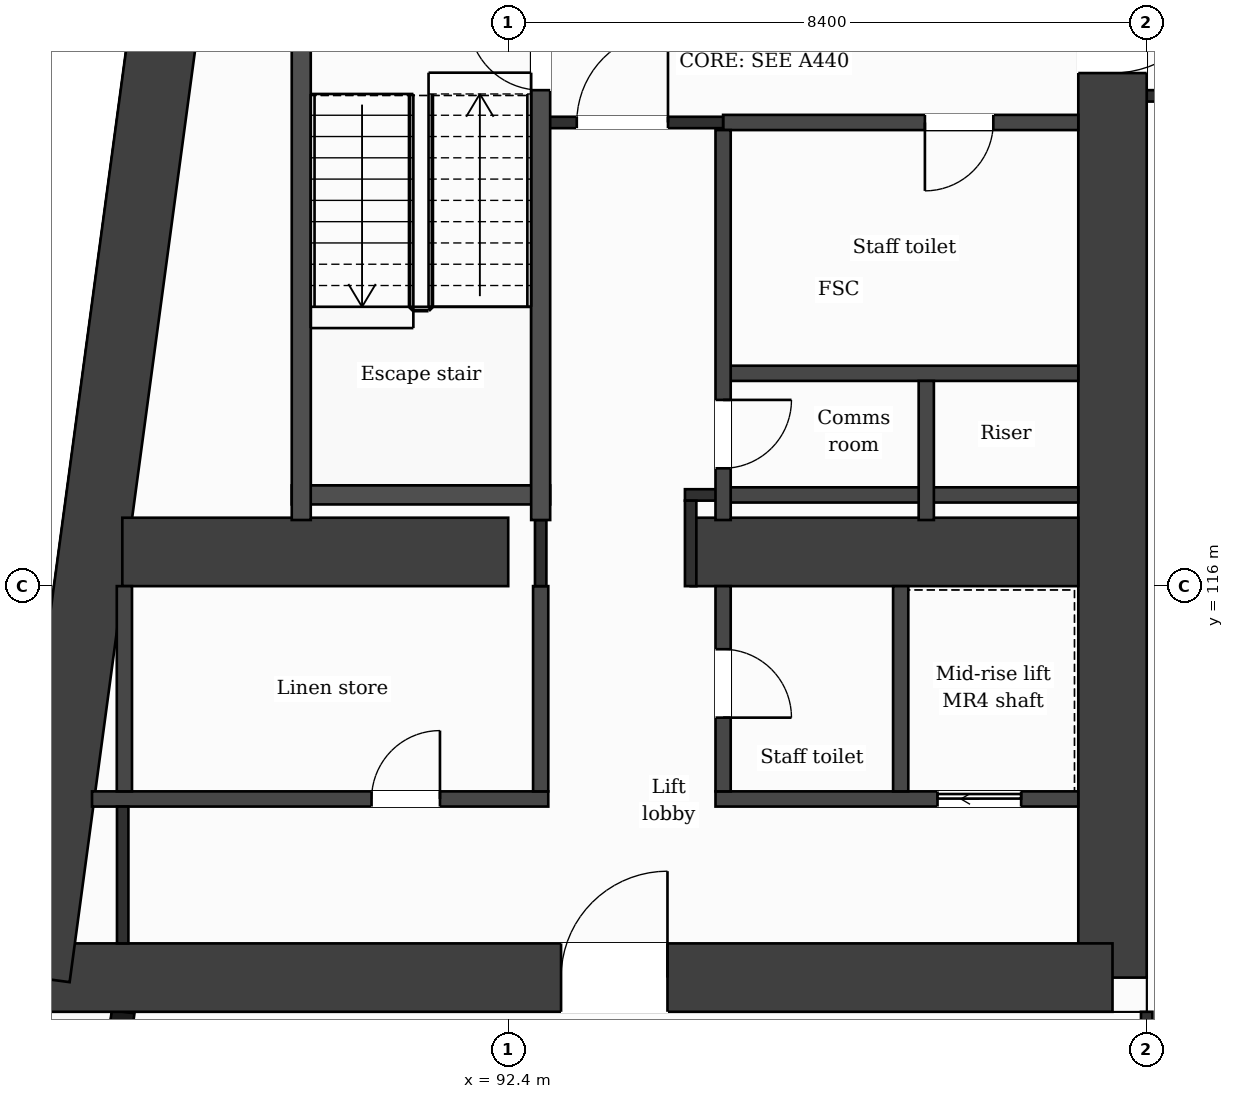
"""IFC4 building model, lengths in metres.
Left out: names, types, materials, properties, quantities, classifications, styles, units other than length and angle.
Written with IfcOpenShell. Run it as: python <this file> out.ifc"""

import sys

from ifc_helpers import new_model, si_unit, direction, frame, frame_2d, origin, place, context, subcontext, project, spatial, rectangle, extrude, element, fill, save


model = new_model("IFC4")
c1 = context("Model", 3, precision=1e-05, world=origin(), true_north=direction((0.0, 1.0)))
c2 = subcontext(c1, "Body", "Model", "MODEL_VIEW")
j1 = project(units=[si_unit("LENGTHUNIT", "METRE"), si_unit("PLANEANGLEUNIT", "RADIAN")], contexts=[c1])
p1 = place(None, origin())
s1 = spatial("IfcSite", under=j1, at=p1, CompositionType="ELEMENT")
p2 = place(p1, origin())
s2 = spatial("IfcBuilding", under=s1, at=p2, CompositionType="ELEMENT")
p3 = place(p2, frame((0.0, 0.0, 166.3)))
s3 = spatial("IfcBuildingStorey", under=s2, at=p3, CompositionType="ELEMENT", Elevation=166.3)
p4 = place(p3, frame((100.35, 131.95, 0.0), z_axis=(0.0, 0.0, 1.0), x_axis=(0.0, -1.0, 0.0)))
e1 = element("IfcWall", 1, at=p4, inside=s3, PredefinedType="SHEAR", context=c2, shape_type="SweptSolid", body=[
    extrude(rectangle(XDim=21.1, YDim=0.9, at=frame_2d((10.55, 0.0))), origin(), (0.0, 0.0, 1.0), 3.7),
])
p5 = place(p4, frame((7.8, 0.0, 0.0)))
e2 = element("IfcOpeningElement", 2, at=p5, cuts=e1, PredefinedType="OPENING", context=c2, shape_type="SweptSolid", body=[
    extrude(rectangle(XDim=1.4, YDim=2.1, at=frame_2d((0.7, 1.05))), frame((0.0, 0.46, 0.0), z_axis=(0.0, -1.0, 0.0), x_axis=(1.0, 0.0, 0.0)), (0.0, 0.0, 1.0), 0.92),
])
p6 = place(p3, frame((100.35, 110.85, 0.0), z_axis=(0.0, 0.0, 1.0), x_axis=(-1.0, 0.0, 0.0)))
e3 = element("IfcWall", 3, at=p6, inside=s3, PredefinedType="SHEAR", context=c2, shape_type="SweptSolid", body=[
    extrude(rectangle(XDim=14.166, YDim=0.9, at=frame_2d((7.083, 0.0))), origin(), (0.0, 0.0, 1.0), 3.7),
])
p7 = place(p6, frame((5.855, 0.0, 0.0)))
e4 = element("IfcOpeningElement", 4, at=p7, cuts=e3, PredefinedType="OPENING", context=c2, shape_type="SweptSolid", body=[
    extrude(rectangle(XDim=1.4, YDim=2.1, at=frame_2d((0.7, 1.05))), frame((0.0, 0.46, 0.0), z_axis=(0.0, -1.0, 0.0), x_axis=(1.0, 0.0, 0.0)), (0.0, 0.0, 1.0), 0.92),
])
p8 = place(p3, frame((86.184, 110.85, 0.0), z_axis=(0.0, 0.0, 1.0), x_axis=(0.133410495943, 0.991060865725, 0.0)))
e5 = element("IfcWall", 5, at=p8, inside=s3, PredefinedType="SHEAR", context=c2, shape_type="SweptSolid", body=[
    extrude(rectangle(XDim=21.29, YDim=0.9, at=frame_2d((10.645, 0.0))), origin(), (0.0, 0.0, 1.0), 3.7),
])
p9 = place(p3, frame((87.323, 116.45, 0.0), z_axis=(0.0, 0.0, 1.0), x_axis=(1.0, 0.0, 0.0)))
e6 = element("IfcWall", 6, at=p9, inside=s3, PredefinedType="SHEAR", context=c2, shape_type="SweptSolid", body=[
    extrude(rectangle(XDim=5.077, YDim=0.9, at=frame_2d((2.539, 0.0))), origin(), (0.0, 0.0, 1.0), 3.7),
])
p10 = place(p3, frame((94.8, 116.45, 0.0), z_axis=(0.0, 0.0, 1.0), x_axis=(1.0, 0.0, 0.0)))
e7 = element("IfcWall", 7, at=p10, inside=s3, PredefinedType="SHEAR", context=c2, shape_type="SweptSolid", body=[
    extrude(rectangle(XDim=5.1, YDim=0.9, at=frame_2d((2.55, 0.0))), origin(), (0.0, 0.0, 1.0), 3.7),
])
p11 = place(p3, frame((87.334, 110.4, 0.0), z_axis=(0.0, 0.0, 1.0), x_axis=(-0.133437175554, -0.991057273915, 0.0)))
e8 = element("IfcWall", 8, at=p11, inside=s3, PredefinedType="SOLIDWALL", context=c2, shape_type="SweptSolid", body=[
    extrude(rectangle(XDim=6.781, YDim=0.3, at=frame_2d((3.39, 0.0))), origin(), (0.0, 0.0, 1.0), 3.38),
])
p12 = place(p11, frame((1.418, 0.0, 0.0)))
e9 = element("IfcOpeningElement", 9, at=p12, cuts=e8, PredefinedType="OPENING", context=c2, shape_type="SweptSolid", body=[
    extrude(rectangle(XDim=1.2, YDim=2.4, at=frame_2d((0.6, 1.2))), frame((0.0, 0.16, 0.0), z_axis=(0.0, -1.0, 0.0), x_axis=(1.0, 0.0, 0.0)), (0.0, 0.0, 1.0), 0.32),
])
p13 = place(p11, frame((4.758, 0.0, 0.9)))
e10 = element("IfcOpeningElement", 10, at=p13, cuts=e8, PredefinedType="OPENING", context=c2, shape_type="SweptSolid", body=[
    extrude(rectangle(XDim=1.2, YDim=2.1, at=frame_2d((0.6, 1.05))), frame((0.0, 0.16, 0.0), z_axis=(0.0, -1.0, 0.0), x_axis=(1.0, 0.0, 0.0)), (0.0, 0.0, 1.0), 0.32),
])
p14 = place(p3, frame((86.924, 113.2, 0.0), z_axis=(0.0, 0.0, 1.0), x_axis=(1.0, 0.0, 0.0)))
e11 = element("IfcWall", 11, at=p14, inside=s3, PredefinedType="PARTITIONING", context=c2, shape_type="SweptSolid", body=[
    extrude(rectangle(XDim=6.003, YDim=0.2, at=frame_2d((3.001, 0.0))), origin(), (0.0, 0.0, 1.0), 3.38),
])
p15 = place(p14, frame((3.678, 0.0, 0.0)))
e12 = element("IfcOpeningElement", 12, at=p15, cuts=e11, PredefinedType="OPENING", context=c2, shape_type="SweptSolid", body=[
    extrude(rectangle(XDim=0.9, YDim=2.1, at=frame_2d((0.45, 1.05))), frame((0.0, 0.11, 0.0), z_axis=(0.0, -1.0, 0.0), x_axis=(1.0, 0.0, 0.0)), (0.0, 0.0, 1.0), 0.22),
])
p16 = place(p3, frame((95.127, 113.2, 0.0), z_axis=(0.0, 0.0, 1.0), x_axis=(1.0, 0.0, 0.0)))
e13 = element("IfcWall", 13, at=p16, inside=s3, PredefinedType="PARTITIONING", context=c2, shape_type="SweptSolid", body=[
    extrude(rectangle(XDim=4.773, YDim=0.2, at=frame_2d((2.386, 0.0))), origin(), (0.0, 0.0, 1.0), 3.38),
])
p17 = place(p16, frame((2.921, 0.0, 0.0)))
e14 = element("IfcOpeningElement", 14, at=p17, cuts=e13, PredefinedType="OPENING", context=c2, shape_type="SweptSolid", body=[
    extrude(rectangle(XDim=1.1, YDim=2.1, at=frame_2d((0.55, 1.05))), frame((0.0, 0.11, 0.0), z_axis=(0.0, -1.0, 0.0), x_axis=(1.0, 0.0, 0.0)), (0.0, 0.0, 1.0), 0.22),
])
p18 = place(p3, frame((95.227, 117.2, 0.0), z_axis=(0.0, 0.0, 1.0), x_axis=(1.0, 0.0, 0.0)))
e15 = element("IfcWall", 15, at=p18, inside=s3, PredefinedType="PARTITIONING", context=c2, shape_type="SweptSolid", body=[
    extrude(rectangle(XDim=4.673, YDim=0.2, at=frame_2d((2.336, 0.0))), origin(), (0.0, 0.0, 1.0), 3.38),
])
p19 = place(p3, frame((94.725, 117.2, 0.0), z_axis=(0.0, 0.0, 1.0), x_axis=(1.0, 0.0, 0.0)))
e16 = element("IfcWall", 16, at=p19, inside=s3, PredefinedType="PARTITIONING", context=c2, shape_type="SweptSolid", body=[
    extrude(rectangle(XDim=0.502, YDim=0.15, at=frame_2d((0.251, 0.0))), origin(), (0.0, 0.0, 1.0), 3.38),
])
p20 = place(p3, frame((89.552, 117.2, 0.0), z_axis=(0.0, 0.0, 1.0), x_axis=(1.0, 0.0, 0.0)))
e17 = element("IfcWall", 17, at=p20, inside=s3, PredefinedType="PARTITIONING", context=c2, shape_type="SweptSolid", body=[
    extrude(rectangle(XDim=3.4, YDim=0.25, at=frame_2d((1.7, 0.0))), origin(), (0.0, 0.0, 1.0), 3.38),
])
p21 = place(p3, frame((95.227, 118.8, 0.0), z_axis=(0.0, 0.0, 1.0), x_axis=(1.0, 0.0, 0.0)))
e18 = element("IfcWall", 18, at=p21, inside=s3, PredefinedType="PARTITIONING", context=c2, shape_type="SweptSolid", body=[
    extrude(rectangle(XDim=4.673, YDim=0.2, at=frame_2d((2.336, 0.0))), origin(), (0.0, 0.0, 1.0), 3.38),
])
p22 = place(p3, frame((95.227, 122.1, 0.0), z_axis=(0.0, 0.0, 1.0), x_axis=(1.0, 0.0, 0.0)))
e19 = element("IfcWall", 19, at=p22, inside=s3, PredefinedType="PARTITIONING", context=c2, shape_type="SweptSolid", body=[
    extrude(rectangle(XDim=4.673, YDim=0.2, at=frame_2d((2.336, 0.0))), origin(), (0.0, 0.0, 1.0), 3.38),
])
p23 = place(p22, frame((2.655, 0.0, 0.0)))
e20 = element("IfcOpeningElement", 20, at=p23, cuts=e19, PredefinedType="OPENING", context=c2, shape_type="SweptSolid", body=[
    extrude(rectangle(XDim=0.9, YDim=2.1, at=frame_2d((0.45, 1.05))), frame((0.0, 0.11, 0.0), z_axis=(0.0, -1.0, 0.0), x_axis=(1.0, 0.0, 0.0)), (0.0, 0.0, 1.0), 0.22),
])
p24 = place(p3, frame((92.827, 122.1, 0.0), z_axis=(0.0, 0.0, 1.0), x_axis=(1.0, 0.0, 0.0)))
e21 = element("IfcWall", 21, at=p24, inside=s3, PredefinedType="PARTITIONING", context=c2, shape_type="SweptSolid", body=[
    extrude(rectangle(XDim=2.4, YDim=0.15, at=frame_2d((1.2, 0.0))), origin(), (0.0, 0.0, 1.0), 3.38),
])
p25 = place(p24, frame((0.475, 0.0, 0.0)))
e22 = element("IfcOpeningElement", 22, at=p25, cuts=e21, PredefinedType="OPENING", context=c2, shape_type="SweptSolid", body=[
    extrude(rectangle(XDim=1.2, YDim=2.1, at=frame_2d((0.6, 1.05))), frame((0.0, 0.085, 0.0), z_axis=(0.0, -1.0, 0.0), x_axis=(1.0, 0.0, 0.0)), (0.0, 0.0, 1.0), 0.17),
])
p26 = place(p3, frame((100.8, 122.45, 0.0), z_axis=(0.0, 0.0, 1.0), x_axis=(1.0, 0.0, 0.0)))
e23 = element("IfcWall", 23, at=p26, inside=s3, PredefinedType="PARTITIONING", context=c2, shape_type="SweptSolid", body=[
    extrude(rectangle(XDim=25.2, YDim=0.15, at=frame_2d((12.6, 0.0))), origin(), (0.0, 0.0, 1.0), 3.38),
])
p27 = place(p3, frame((87.35, 113.3, 0.0), z_axis=(0.0, 0.0, 1.0), x_axis=(0.0, 1.0, 0.0)))
e24 = element("IfcWall", 24, at=p27, inside=s3, PredefinedType="PARTITIONING", context=c2, shape_type="SweptSolid", body=[
    extrude(rectangle(XDim=2.7, YDim=0.2, at=frame_2d((1.35, 0.0))), origin(), (0.0, 0.0, 1.0), 3.38),
])
p28 = place(p3, frame((87.328, 111.3, 0.0), z_axis=(0.0, 0.0, 1.0), x_axis=(0.0, 1.0, 0.0)))
e25 = element("IfcWall", 25, at=p28, inside=s3, PredefinedType="PARTITIONING", context=c2, shape_type="SweptSolid", body=[
    extrude(rectangle(XDim=1.8, YDim=0.15, at=frame_2d((0.9, 0.0))), origin(), (0.0, 0.0, 1.0), 3.38),
])
p29 = place(p3, frame((89.677, 116.87, 0.0), z_axis=(0.0, 0.0, 1.0), x_axis=(0.0, 1.0, 0.0)))
e26 = element("IfcWall", 26, at=p29, inside=s3, PredefinedType="PARTITIONING", context=c2, shape_type="SweptSolid", body=[
    extrude(rectangle(XDim=6.955, YDim=0.25, at=frame_2d((3.478, 0.0))), origin(), (0.0, 0.0, 1.0), 3.38),
])
p30 = place(p3, frame((92.827, 113.3, 0.0), z_axis=(0.0, 0.0, 1.0), x_axis=(0.0, 1.0, 0.0)))
e27 = element("IfcWall", 27, at=p30, inside=s3, PredefinedType="PARTITIONING", context=c2, shape_type="SweptSolid", body=[
    extrude(rectangle(XDim=2.7, YDim=0.2, at=frame_2d((1.35, 0.0))), origin(), (0.0, 0.0, 1.0), 3.38),
])
p31 = place(p3, frame((92.827, 116.0, 0.0), z_axis=(0.0, 0.0, 1.0), x_axis=(0.0, 1.0, 0.0)))
e28 = element("IfcWall", 28, at=p31, inside=s3, PredefinedType="PARTITIONING", context=c2, shape_type="SweptSolid", body=[
    extrude(rectangle(XDim=0.87, YDim=0.15, at=frame_2d((0.435, 0.0))), origin(), (0.0, 0.0, 1.0), 3.38),
])
p32 = place(p3, frame((92.827, 116.87, 0.0), z_axis=(0.0, 0.0, 1.0), x_axis=(0.0, 1.0, 0.0)))
e29 = element("IfcWall", 29, at=p32, inside=s3, PredefinedType="PARTITIONING", context=c2, shape_type="SweptSolid", body=[
    extrude(rectangle(XDim=6.955, YDim=0.25, at=frame_2d((3.478, 0.0))), origin(), (0.0, 0.0, 1.0), 3.38),
])
p33 = place(p32, frame((5.655, 0.0, 0.0)))
e30 = element("IfcOpeningElement", 30, at=p33, cuts=e29, PredefinedType="OPENING", context=c2, shape_type="SweptSolid", body=[
    extrude(rectangle(XDim=0.95, YDim=2.1, at=frame_2d((0.475, 1.05))), frame((0.0, 0.135, 0.0), z_axis=(0.0, -1.0, 0.0), x_axis=(1.0, 0.0, 0.0)), (0.0, 0.0, 1.0), 0.27),
])
p34 = place(p3, frame((94.8, 116.0, 0.0), z_axis=(0.0, 0.0, 1.0), x_axis=(0.0, 1.0, 0.0)))
e31 = element("IfcWall", 31, at=p34, inside=s3, PredefinedType="PARTITIONING", context=c2, shape_type="SweptSolid", body=[
    extrude(rectangle(XDim=1.125, YDim=0.15, at=frame_2d((0.562, 0.0))), origin(), (0.0, 0.0, 1.0), 3.38),
])
p35 = place(p3, frame((95.227, 113.3, 0.0), z_axis=(0.0, 0.0, 1.0), x_axis=(0.0, 1.0, 0.0)))
e32 = element("IfcWall", 32, at=p35, inside=s3, PredefinedType="PARTITIONING", context=c2, shape_type="SweptSolid", body=[
    extrude(rectangle(XDim=2.7, YDim=0.2, at=frame_2d((1.35, 0.0))), origin(), (0.0, 0.0, 1.0), 3.38),
])
p36 = place(p35, frame((0.97, 0.0, 0.0)))
e33 = element("IfcOpeningElement", 33, at=p36, cuts=e32, PredefinedType="OPENING", context=c2, shape_type="SweptSolid", body=[
    extrude(rectangle(XDim=0.9, YDim=2.1, at=frame_2d((0.45, 1.05))), frame((0.0, 0.11, 0.0), z_axis=(0.0, -1.0, 0.0), x_axis=(1.0, 0.0, 0.0)), (0.0, 0.0, 1.0), 0.22),
])
p37 = place(p3, frame((95.227, 116.87, 0.0), z_axis=(0.0, 0.0, 1.0), x_axis=(0.0, 1.0, 0.0)))
e34 = element("IfcWall", 34, at=p37, inside=s3, PredefinedType="PARTITIONING", context=c2, shape_type="SweptSolid", body=[
    extrude(rectangle(XDim=5.13, YDim=0.2, at=frame_2d((2.565, 0.0))), origin(), (0.0, 0.0, 1.0), 3.38),
])
p38 = place(p37, frame((0.68, 0.0, 0.0)))
e35 = element("IfcOpeningElement", 35, at=p38, cuts=e34, PredefinedType="OPENING", context=c2, shape_type="SweptSolid", body=[
    extrude(rectangle(XDim=0.9, YDim=2.1, at=frame_2d((0.45, 1.05))), frame((0.0, 0.11, 0.0), z_axis=(0.0, -1.0, 0.0), x_axis=(1.0, 0.0, 0.0)), (0.0, 0.0, 1.0), 0.22),
])
p39 = place(p3, frame((97.563, 113.3, 0.0), z_axis=(0.0, 0.0, 1.0), x_axis=(0.0, 1.0, 0.0)))
e36 = element("IfcWall", 36, at=p39, inside=s3, PredefinedType="PARTITIONING", context=c2, shape_type="SweptSolid", body=[
    extrude(rectangle(XDim=2.7, YDim=0.2, at=frame_2d((1.35, 0.0))), origin(), (0.0, 0.0, 1.0), 3.38),
])
p40 = place(p3, frame((97.9, 116.87, 0.0), z_axis=(0.0, 0.0, 1.0), x_axis=(0.0, 1.0, 0.0)))
e37 = element("IfcWall", 37, at=p40, inside=s3, PredefinedType="PARTITIONING", context=c2, shape_type="SweptSolid", body=[
    extrude(rectangle(XDim=1.83, YDim=0.2, at=frame_2d((0.915, 0.0))), origin(), (0.0, 0.0, 1.0), 3.38),
])
p41 = place(p3, frame((100.8, 109.075, 0.0), z_axis=(0.0, 0.0, 1.0), x_axis=(0.0, 1.0, 0.0)))
e38 = element("IfcWall", 38, at=p41, inside=s3, PredefinedType="PARTITIONING", context=c2, shape_type="SweptSolid", body=[
    extrude(rectangle(XDim=1.325, YDim=0.15, at=frame_2d((0.663, 0.0))), origin(), (0.0, 0.0, 1.0), 3.38),
])
p42 = place(p25, origin())
e39 = element("IfcDoor", 39, at=p42, inside=s3, OperationType="SINGLE_SWING_RIGHT", PredefinedType="DOOR", context=c2, shape_type="SweptSolid", body=[
    extrude(rectangle(XDim=1.2, YDim=2.1, at=frame_2d((0.6, 1.05))), frame((0.0, 0.025, 0.0), z_axis=(0.0, -1.0, 0.0), x_axis=(1.0, 0.0, 0.0)), (0.0, 0.0, 1.0), 0.05),
])
fill(e22, e39)
p43 = place(p23, origin())
e40 = element("IfcDoor", 40, at=p43, inside=s3, OperationType="SINGLE_SWING_LEFT", PredefinedType="DOOR", context=c2, shape_type="SweptSolid", body=[
    extrude(rectangle(XDim=0.9, YDim=2.1, at=frame_2d((0.45, 1.05))), frame((0.0, 0.025, 0.0), z_axis=(0.0, -1.0, 0.0), x_axis=(1.0, 0.0, 0.0)), (0.0, 0.0, 1.0), 0.05),
])
fill(e20, e40)
p44 = place(p33, origin())
e41 = element("IfcDoor", 41, at=p44, inside=s3, OperationType="SINGLE_SWING_RIGHT", PredefinedType="DOOR", context=c2, shape_type="SweptSolid", body=[
    extrude(rectangle(XDim=0.95, YDim=2.1, at=frame_2d((0.475, 1.05))), frame((0.0, 0.025, 0.0), z_axis=(0.0, -1.0, 0.0), x_axis=(1.0, 0.0, 0.0)), (0.0, 0.0, 1.0), 0.05),
])
fill(e30, e41)
p45 = place(p38, origin())
e42 = element("IfcDoor", 42, at=p45, inside=s3, OperationType="SINGLE_SWING_RIGHT", PredefinedType="DOOR", context=c2, shape_type="SweptSolid", body=[
    extrude(rectangle(XDim=0.9, YDim=2.1, at=frame_2d((0.45, 1.05))), frame((0.0, 0.025, 0.0), z_axis=(0.0, -1.0, 0.0), x_axis=(1.0, 0.0, 0.0)), (0.0, 0.0, 1.0), 0.05),
])
fill(e35, e42)
p46 = place(p17, origin())
e43 = element("IfcDoor", 43, at=p46, inside=s3, OperationType="SLIDING_TO_LEFT", PredefinedType="DOOR", context=c2, shape_type="SweptSolid", body=[
    extrude(rectangle(XDim=1.1, YDim=2.1, at=frame_2d((0.55, 1.05))), frame((0.0, 0.025, 0.0), z_axis=(0.0, -1.0, 0.0), x_axis=(1.0, 0.0, 0.0)), (0.0, 0.0, 1.0), 0.05),
])
fill(e14, e43)
p47 = place(p15, origin())
e44 = element("IfcDoor", 44, at=p47, inside=s3, OperationType="SINGLE_SWING_RIGHT", PredefinedType="DOOR", context=c2, shape_type="SweptSolid", body=[
    extrude(rectangle(XDim=0.9, YDim=2.1, at=frame_2d((0.45, 1.05))), frame((0.0, 0.025, 0.0), z_axis=(0.0, -1.0, 0.0), x_axis=(1.0, 0.0, 0.0)), (0.0, 0.0, 1.0), 0.05),
])
fill(e12, e44)
p48 = place(p36, origin())
e45 = element("IfcDoor", 45, at=p48, inside=s3, OperationType="SINGLE_SWING_LEFT", PredefinedType="DOOR", context=c2, shape_type="SweptSolid", body=[
    extrude(rectangle(XDim=0.9, YDim=2.1, at=frame_2d((0.45, 1.05))), frame((0.0, 0.025, 0.0), z_axis=(0.0, -1.0, 0.0), x_axis=(1.0, 0.0, 0.0)), (0.0, 0.0, 1.0), 0.05),
])
fill(e33, e45)
p49 = place(p7, origin())
e46 = element("IfcDoor", 46, at=p49, inside=s3, OperationType="SINGLE_SWING_LEFT", PredefinedType="DOOR", context=c2, shape_type="SweptSolid", body=[
    extrude(rectangle(XDim=1.4, YDim=2.1, at=frame_2d((0.7, 1.05))), frame((0.0, 0.025, 0.0), z_axis=(0.0, -1.0, 0.0), x_axis=(1.0, 0.0, 0.0)), (0.0, 0.0, 1.0), 0.05),
])
fill(e4, e46)
p50 = place(p5, origin())
e47 = element("IfcDoor", 47, at=p50, inside=s3, OperationType="SINGLE_SWING_LEFT", PredefinedType="DOOR", context=c2, shape_type="SweptSolid", body=[
    extrude(rectangle(XDim=1.4, YDim=2.1, at=frame_2d((0.7, 1.05))), frame((0.0, 0.025, 0.0), z_axis=(0.0, -1.0, 0.0), x_axis=(1.0, 0.0, 0.0)), (0.0, 0.0, 1.0), 0.05),
])
fill(e2, e47)
save(model, sys.argv[1])
